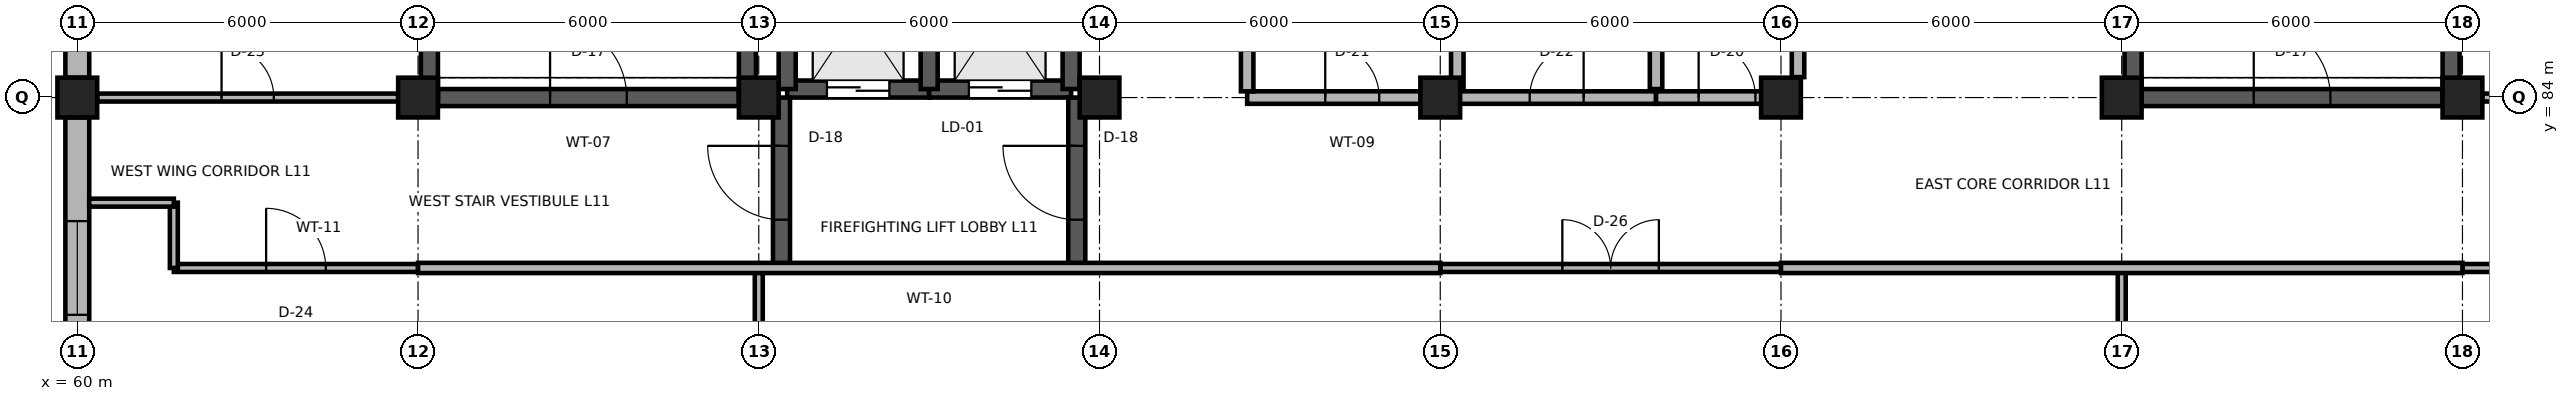
"""IFC4 building model, lengths in metres.
Left out: names, types, materials, properties, quantities, classifications, styles, units other than length and angle.
Written with IfcOpenShell. Run it as: python <this file> out.ifc"""

import sys

from ifc_helpers import new_model, si_unit, direction, frame, frame_2d, origin, origin_2d, place, context, subcontext, project, spatial, rectangle, extrude, element, fill, save


model = new_model("IFC4")
c1 = context("Model", 3, precision=1e-05, world=origin(), true_north=direction((0.0, 1.0)))
c2 = subcontext(c1, "Body", "Model", "MODEL_VIEW")
j1 = project(units=[si_unit("LENGTHUNIT", "METRE"), si_unit("PLANEANGLEUNIT", "RADIAN")], contexts=[c1])
p1 = place(None, origin())
s1 = spatial("IfcSite", under=j1, at=p1, CompositionType="ELEMENT")
p2 = place(p1, origin())
s2 = spatial("IfcBuilding", under=s1, at=p2, CompositionType="ELEMENT")
p3 = place(p2, frame((0.0, 0.0, 44.4)))
s3 = spatial("IfcBuildingStorey", under=s2, at=p3, CompositionType="ELEMENT", Elevation=44.4)
for number, where, z_axis, x_axis in (
    (1, (60.0, 84.0, 0.0), (0.0, 0.0, 1.0), (1.0, 0.0, 0.0)),
    (2, (66.0, 84.0, 0.0), (0.0, 0.0, 1.0), (1.0, 0.0, 0.0)),
    (3, (72.0, 84.0, 0.0), (0.0, 0.0, 1.0), (1.0, 0.0, 0.0)),
    (4, (78.0, 84.0, 0.0), (0.0, 0.0, 1.0), (1.0, 0.0, 0.0)),
    (5, (84.0, 84.0, 0.0), (0.0, 0.0, 1.0), (1.0, 0.0, 0.0)),
    (6, (90.0, 84.0, 0.0), (0.0, 0.0, 1.0), (1.0, 0.0, 0.0)),
    (7, (96.0, 84.0, 0.0), (0.0, 0.0, 1.0), (1.0, 0.0, 0.0)),
    (8, (102.0, 84.0, 0.0), (0.0, 0.0, 1.0), (1.0, 0.0, 0.0)),
):
    element("IfcColumn", number, at=place(p3, frame(where, z_axis=z_axis, x_axis=x_axis)), inside=s3, PredefinedType="COLUMN", context=c2, shape_type="SweptSolid", body=[
        extrude(rectangle(XDim=0.7, YDim=0.7, at=origin_2d()), origin(), (0.0, 0.0, 1.0), 3.9),
    ])
p4 = place(p3, frame((60.0, 78.35, 0.0), z_axis=(0.0, 0.0, 1.0), x_axis=(0.0, 1.0, 0.0)))
e9 = element("IfcWall", 9, at=p4, inside=s3, PredefinedType="SOLIDWALL", context=c2, shape_type="SweptSolid", body=[
    extrude(rectangle(XDim=5.3, YDim=0.42, at=frame_2d((2.65, 0.0))), origin(), (0.0, 0.0, 1.0), 3.32),
])
p5 = place(p4, frame((1.825, 0.0, 0.85)))
e10 = element("IfcOpeningElement", 10, at=p5, cuts=e9, PredefinedType="OPENING", context=c2, shape_type="SweptSolid", body=[
    extrude(rectangle(XDim=1.65, YDim=1.95, at=frame_2d((0.825, 0.975))), frame((0.0, 0.225, 0.0), z_axis=(0.0, -1.0, 0.0), x_axis=(1.0, 0.0, 0.0)), (0.0, 0.0, 1.0), 0.45),
])
p6 = place(p3, frame((60.0, 84.35, 0.0), z_axis=(0.0, 0.0, 1.0), x_axis=(0.0, 1.0, 0.0)))
e11 = element("IfcWall", 11, at=p6, inside=s3, PredefinedType="SOLIDWALL", context=c2, shape_type="SweptSolid", body=[
    extrude(rectangle(XDim=5.3, YDim=0.42, at=frame_2d((2.65, 0.0))), origin(), (0.0, 0.0, 1.0), 3.32),
])
p7 = place(p6, frame((1.825, 0.0, 0.85)))
e12 = element("IfcOpeningElement", 12, at=p7, cuts=e11, PredefinedType="OPENING", context=c2, shape_type="SweptSolid", body=[
    extrude(rectangle(XDim=1.65, YDim=1.95, at=frame_2d((0.825, 0.975))), frame((0.0, 0.225, 0.0), z_axis=(0.0, -1.0, 0.0), x_axis=(1.0, 0.0, 0.0)), (0.0, 0.0, 1.0), 0.45),
])
p8 = place(p3, frame((66.35, 84.0, 0.0), z_axis=(0.0, 0.0, 1.0), x_axis=(1.0, 0.0, 0.0)))
e13 = element("IfcWall", 13, at=p8, inside=s3, PredefinedType="SHEAR", context=c2, shape_type="SweptSolid", body=[
    extrude(rectangle(XDim=5.3, YDim=0.3, at=frame_2d((2.65, 0.0))), origin(), (0.0, 0.0, 1.0), 3.66),
])
p9 = place(p8, frame((1.975, 0.0, 0.0)))
e14 = element("IfcOpeningElement", 14, at=p9, cuts=e13, PredefinedType="OPENING", context=c2, shape_type="SweptSolid", body=[
    extrude(rectangle(XDim=1.35, YDim=2.2, at=frame_2d((0.675, 1.1))), frame((0.0, 0.165, 0.0), z_axis=(0.0, -1.0, 0.0), x_axis=(1.0, 0.0, 0.0)), (0.0, 0.0, 1.0), 0.33),
])
for number, where, z_axis, x_axis in (
    (15, (66.2, 84.0, 0.0), (0.0, 0.0, 1.0), (0.0, 1.0, 0.0)),
    (16, (71.8, 84.0, 0.0), (0.0, 0.0, 1.0), (0.0, 1.0, 0.0)),
):
    element("IfcWall", number, at=place(p3, frame(where, z_axis=z_axis, x_axis=x_axis)), inside=s3, PredefinedType="SHEAR", context=c2, shape_type="SweptSolid", body=[
        extrude(rectangle(XDim=11.8, YDim=0.3, at=frame_2d((5.9, 0.0))), origin(), (0.0, 0.0, 1.0), 3.74),
    ])
p10 = place(p3, frame((96.35, 84.0, 0.0), z_axis=(0.0, 0.0, 1.0), x_axis=(1.0, 0.0, 0.0)))
e17 = element("IfcWall", 17, at=p10, inside=s3, PredefinedType="SHEAR", context=c2, shape_type="SweptSolid", body=[
    extrude(rectangle(XDim=5.3, YDim=0.3, at=frame_2d((2.65, 0.0))), origin(), (0.0, 0.0, 1.0), 3.66),
])
p11 = place(p10, frame((1.975, 0.0, 0.0)))
e18 = element("IfcOpeningElement", 18, at=p11, cuts=e17, PredefinedType="OPENING", context=c2, shape_type="SweptSolid", body=[
    extrude(rectangle(XDim=1.35, YDim=2.2, at=frame_2d((0.675, 1.1))), frame((0.0, 0.165, 0.0), z_axis=(0.0, -1.0, 0.0), x_axis=(1.0, 0.0, 0.0)), (0.0, 0.0, 1.0), 0.33),
])
for number, where, z_axis, x_axis in (
    (19, (96.2, 84.0, 0.0), (0.0, 0.0, 1.0), (0.0, 1.0, 0.0)),
    (20, (101.8, 84.0, 0.0), (0.0, 0.0, 1.0), (0.0, 1.0, 0.0)),
):
    element("IfcWall", number, at=place(p3, frame(where, z_axis=z_axis, x_axis=x_axis)), inside=s3, PredefinedType="SHEAR", context=c2, shape_type="SweptSolid", body=[
        extrude(rectangle(XDim=11.8, YDim=0.3, at=frame_2d((5.9, 0.0))), origin(), (0.0, 0.0, 1.0), 3.74),
    ])
p12 = place(p3, frame((72.5, 84.15, 0.0), z_axis=(0.0, 0.0, 1.0), x_axis=(1.0, 0.0, 0.0)))
e21 = element("IfcWall", 21, at=p12, inside=s3, PredefinedType="SHEAR", context=c2, shape_type="SweptSolid", body=[
    extrude(rectangle(XDim=2.5, YDim=0.3, at=frame_2d((1.25, 0.0))), origin(), (0.0, 0.0, 1.0), 3.74),
])
p13 = place(p12, frame((0.7, 0.0, 0.0)))
e22 = element("IfcOpeningElement", 22, at=p13, cuts=e21, PredefinedType="OPENING", context=c2, shape_type="SweptSolid", body=[
    extrude(rectangle(XDim=1.1, YDim=2.1, at=frame_2d((0.55, 1.05))), frame((0.0, 0.165, 0.0), z_axis=(0.0, -1.0, 0.0), x_axis=(1.0, 0.0, 0.0)), (0.0, 0.0, 1.0), 0.33),
])
p14 = place(p3, frame((72.5, 84.15, 0.0), z_axis=(0.0, 0.0, 1.0), x_axis=(0.0, 1.0, 0.0)))
e23 = element("IfcWall", 23, at=p14, inside=s3, PredefinedType="SHEAR", context=c2, shape_type="SweptSolid", body=[
    extrude(rectangle(XDim=3.4, YDim=0.3, at=frame_2d((1.7, 0.0))), origin(), (0.0, 0.0, 1.0), 3.74),
])
p15 = place(p3, frame((75.0, 84.15, 0.0), z_axis=(0.0, 0.0, 1.0), x_axis=(1.0, 0.0, 0.0)))
e24 = element("IfcWall", 24, at=p15, inside=s3, PredefinedType="SHEAR", context=c2, shape_type="SweptSolid", body=[
    extrude(rectangle(XDim=2.5, YDim=0.3, at=frame_2d((1.25, 0.0))), origin(), (0.0, 0.0, 1.0), 3.74),
])
p16 = place(p15, frame((0.7, 0.0, 0.0)))
e25 = element("IfcOpeningElement", 25, at=p16, cuts=e24, PredefinedType="OPENING", context=c2, shape_type="SweptSolid", body=[
    extrude(rectangle(XDim=1.1, YDim=2.1, at=frame_2d((0.55, 1.05))), frame((0.0, 0.165, 0.0), z_axis=(0.0, -1.0, 0.0), x_axis=(1.0, 0.0, 0.0)), (0.0, 0.0, 1.0), 0.33),
])
for number, where, z_axis, x_axis in (
    (26, (75.0, 84.15, 0.0), (0.0, 0.0, 1.0), (0.0, 1.0, 0.0)),
    (27, (77.5, 84.15, 0.0), (0.0, 0.0, 1.0), (0.0, 1.0, 0.0)),
):
    element("IfcWall", number, at=place(p3, frame(where, z_axis=z_axis, x_axis=x_axis)), inside=s3, PredefinedType="SHEAR", context=c2, shape_type="SweptSolid", body=[
        extrude(rectangle(XDim=3.4, YDim=0.3, at=frame_2d((1.7, 0.0))), origin(), (0.0, 0.0, 1.0), 3.74),
    ])
p17 = place(p3, frame((72.4, 81.0, 0.0), z_axis=(0.0, 0.0, 1.0), x_axis=(0.0, 1.0, 0.0)))
e28 = element("IfcWall", 28, at=p17, inside=s3, PredefinedType="SHEAR", context=c2, shape_type="SweptSolid", body=[
    extrude(rectangle(XDim=3.0, YDim=0.3, at=frame_2d((1.5, 0.0))), origin(), (0.0, 0.0, 1.0), 3.74),
])
p18 = place(p17, frame((0.85, 0.0, 0.0)))
e29 = element("IfcOpeningElement", 29, at=p18, cuts=e28, PredefinedType="OPENING", context=c2, shape_type="SweptSolid", body=[
    extrude(rectangle(XDim=1.3, YDim=2.2, at=frame_2d((0.65, 1.1))), frame((0.0, 0.165, 0.0), z_axis=(0.0, -1.0, 0.0), x_axis=(1.0, 0.0, 0.0)), (0.0, 0.0, 1.0), 0.33),
])
p19 = place(p3, frame((77.6, 81.0, 0.0), z_axis=(0.0, 0.0, 1.0), x_axis=(0.0, 1.0, 0.0)))
e30 = element("IfcWall", 30, at=p19, inside=s3, PredefinedType="SHEAR", context=c2, shape_type="SweptSolid", body=[
    extrude(rectangle(XDim=3.0, YDim=0.3, at=frame_2d((1.5, 0.0))), origin(), (0.0, 0.0, 1.0), 3.74),
])
p20 = place(p19, frame((0.85, 0.0, 0.0)))
e31 = element("IfcOpeningElement", 31, at=p20, cuts=e30, PredefinedType="OPENING", context=c2, shape_type="SweptSolid", body=[
    extrude(rectangle(XDim=1.3, YDim=2.2, at=frame_2d((0.65, 1.1))), frame((0.0, 0.165, 0.0), z_axis=(0.0, -1.0, 0.0), x_axis=(1.0, 0.0, 0.0)), (0.0, 0.0, 1.0), 0.33),
])
p21 = place(p3, frame((80.6, 84.0, 0.0), z_axis=(0.0, 0.0, 1.0), x_axis=(1.0, 0.0, 0.0)))
e32 = element("IfcWall", 32, at=p21, inside=s3, PredefinedType="PARTITIONING", context=c2, shape_type="SweptSolid", body=[
    extrude(rectangle(XDim=3.7, YDim=0.22, at=frame_2d((1.85, 0.0))), origin(), (0.0, 0.0, 1.0), 3.348),
])
p22 = place(p21, frame((1.375, 0.0, 0.0)))
e33 = element("IfcOpeningElement", 33, at=p22, cuts=e32, PredefinedType="OPENING", context=c2, shape_type="SweptSolid", body=[
    extrude(rectangle(XDim=0.95, YDim=2.15, at=frame_2d((0.475, 1.075))), frame((0.0, 0.125, 0.0), z_axis=(0.0, -1.0, 0.0), x_axis=(1.0, 0.0, 0.0)), (0.0, 0.0, 1.0), 0.25),
])
p23 = place(p3, frame((84.3, 84.0, 0.0), z_axis=(0.0, 0.0, 1.0), x_axis=(1.0, 0.0, 0.0)))
e34 = element("IfcWall", 34, at=p23, inside=s3, PredefinedType="PARTITIONING", context=c2, shape_type="SweptSolid", body=[
    extrude(rectangle(XDim=3.5, YDim=0.22, at=frame_2d((1.75, 0.0))), origin(), (0.0, 0.0, 1.0), 3.348),
])
p24 = place(p23, frame((1.275, 0.0, 0.0)))
e35 = element("IfcOpeningElement", 35, at=p24, cuts=e34, PredefinedType="OPENING", context=c2, shape_type="SweptSolid", body=[
    extrude(rectangle(XDim=0.95, YDim=2.1, at=frame_2d((0.475, 1.05))), frame((0.0, 0.125, 0.0), z_axis=(0.0, -1.0, 0.0), x_axis=(1.0, 0.0, 0.0)), (0.0, 0.0, 1.0), 0.25),
])
p25 = place(p3, frame((87.8, 84.0, 0.0), z_axis=(0.0, 0.0, 1.0), x_axis=(1.0, 0.0, 0.0)))
e36 = element("IfcWall", 36, at=p25, inside=s3, PredefinedType="PARTITIONING", context=c2, shape_type="SweptSolid", body=[
    extrude(rectangle(XDim=2.5, YDim=0.22, at=frame_2d((1.25, 0.0))), origin(), (0.0, 0.0, 1.0), 3.348),
])
p26 = place(p25, frame((0.75, 0.0, 0.0)))
e37 = element("IfcOpeningElement", 37, at=p26, cuts=e36, PredefinedType="OPENING", context=c2, shape_type="SweptSolid", body=[
    extrude(rectangle(XDim=1.0, YDim=2.15, at=frame_2d((0.5, 1.075))), frame((0.0, 0.125, 0.0), z_axis=(0.0, -1.0, 0.0), x_axis=(1.0, 0.0, 0.0)), (0.0, 0.0, 1.0), 0.25),
])
for number, where, z_axis, x_axis in (
    (38, (84.3, 84.15, 0.0), (0.0, 0.0, 1.0), (0.0, 1.0, 0.0)),
    (39, (87.8, 84.15, 0.0), (0.0, 0.0, 1.0), (0.0, 1.0, 0.0)),
):
    element("IfcWall", number, at=place(p3, frame(where, z_axis=z_axis, x_axis=x_axis)), inside=s3, PredefinedType="PARTITIONING", context=c2, shape_type="SweptSolid", body=[
        extrude(rectangle(XDim=5.0, YDim=0.22, at=frame_2d((2.5, 0.0))), origin(), (0.0, 0.0, 1.0), 3.74),
    ])
p27 = place(p3, frame((61.7, 81.0, 0.0), z_axis=(0.0, 0.0, 1.0), x_axis=(1.0, 0.0, 0.0)))
e40 = element("IfcWall", 40, at=p27, inside=s3, PredefinedType="PARTITIONING", context=c2, shape_type="SweptSolid", body=[
    extrude(rectangle(XDim=4.3, YDim=0.14, at=frame_2d((2.15, 0.0))), origin(), (0.0, 0.0, 1.0), 3.74),
])
p28 = place(p27, frame((1.625, 0.0, 0.0)))
e41 = element("IfcOpeningElement", 41, at=p28, cuts=e40, PredefinedType="OPENING", context=c2, shape_type="SweptSolid", body=[
    extrude(rectangle(XDim=1.05, YDim=2.25, at=frame_2d((0.525, 1.125))), frame((0.0, 0.085, 0.0), z_axis=(0.0, -1.0, 0.0), x_axis=(1.0, 0.0, 0.0)), (0.0, 0.0, 1.0), 0.17),
])
p29 = place(p3, frame((84.0, 81.0, 0.0), z_axis=(0.0, 0.0, 1.0), x_axis=(1.0, 0.0, 0.0)))
e42 = element("IfcWall", 42, at=p29, inside=s3, PredefinedType="PARTITIONING", context=c2, shape_type="SweptSolid", body=[
    extrude(rectangle(XDim=6.0, YDim=0.14, at=frame_2d((3.0, 0.0))), origin(), (0.0, 0.0, 1.0), 3.74),
])
p30 = place(p29, frame((2.15, 0.0, 0.0)))
e43 = element("IfcOpeningElement", 43, at=p30, cuts=e42, PredefinedType="OPENING", context=c2, shape_type="SweptSolid", body=[
    extrude(rectangle(XDim=1.7, YDim=2.45, at=frame_2d((0.85, 1.225))), frame((0.0, 0.085, 0.0), z_axis=(0.0, -1.0, 0.0), x_axis=(1.0, 0.0, 0.0)), (0.0, 0.0, 1.0), 0.17),
])
p31 = place(p3, frame((102.0, 81.0, 0.0), z_axis=(0.0, 0.0, 1.0), x_axis=(1.0, 0.0, 0.0)))
e44 = element("IfcWall", 44, at=p31, inside=s3, PredefinedType="PARTITIONING", context=c2, shape_type="SweptSolid", body=[
    extrude(rectangle(XDim=4.3, YDim=0.14, at=frame_2d((2.15, 0.0))), origin(), (0.0, 0.0, 1.0), 3.74),
])
p32 = place(p31, frame((1.625, 0.0, 0.0)))
e45 = element("IfcOpeningElement", 45, at=p32, cuts=e44, PredefinedType="OPENING", context=c2, shape_type="SweptSolid", body=[
    extrude(rectangle(XDim=1.05, YDim=2.25, at=frame_2d((0.525, 1.125))), frame((0.0, 0.085, 0.0), z_axis=(0.0, -1.0, 0.0), x_axis=(1.0, 0.0, 0.0)), (0.0, 0.0, 1.0), 0.17),
])
p33 = place(p3, frame((60.35, 84.0, 0.0), z_axis=(0.0, 0.0, 1.0), x_axis=(1.0, 0.0, 0.0)))
e46 = element("IfcWall", 46, at=p33, inside=s3, PredefinedType="PARTITIONING", context=c2, shape_type="SweptSolid", body=[
    extrude(rectangle(XDim=5.3, YDim=0.14, at=frame_2d((2.65, 0.0))), origin(), (0.0, 0.0, 1.0), 3.348),
])
p34 = place(p33, frame((2.19, 0.0, 0.0)))
e47 = element("IfcOpeningElement", 47, at=p34, cuts=e46, PredefinedType="OPENING", context=c2, shape_type="SweptSolid", body=[
    extrude(rectangle(XDim=0.92, YDim=2.15, at=frame_2d((0.46, 1.075))), frame((0.0, 0.085, 0.0), z_axis=(0.0, -1.0, 0.0), x_axis=(1.0, 0.0, 0.0)), (0.0, 0.0, 1.0), 0.17),
])
p35 = place(p3, frame((102.35, 84.0, 0.0), z_axis=(0.0, 0.0, 1.0), x_axis=(1.0, 0.0, 0.0)))
e48 = element("IfcWall", 48, at=p35, inside=s3, PredefinedType="PARTITIONING", context=c2, shape_type="SweptSolid", body=[
    extrude(rectangle(XDim=5.3, YDim=0.14, at=frame_2d((2.65, 0.0))), origin(), (0.0, 0.0, 1.0), 3.348),
])
p36 = place(p35, frame((2.19, 0.0, 0.0)))
e49 = element("IfcOpeningElement", 49, at=p36, cuts=e48, PredefinedType="OPENING", context=c2, shape_type="SweptSolid", body=[
    extrude(rectangle(XDim=0.92, YDim=2.15, at=frame_2d((0.46, 1.075))), frame((0.0, 0.085, 0.0), z_axis=(0.0, -1.0, 0.0), x_axis=(1.0, 0.0, 0.0)), (0.0, 0.0, 1.0), 0.17),
])
for number, where, z_axis, x_axis in (
    (50, (72.0, 72.65, 0.0), (0.0, 0.0, 1.0), (0.0, 1.0, 0.0)),
    (51, (96.0, 72.65, 0.0), (0.0, 0.0, 1.0), (0.0, 1.0, 0.0)),
):
    element("IfcWall", number, at=place(p3, frame(where, z_axis=z_axis, x_axis=x_axis)), inside=s3, PredefinedType="PARTITIONING", context=c2, shape_type="SweptSolid", body=[
        extrude(rectangle(XDim=8.35, YDim=0.14, at=frame_2d((4.175, 0.0))), origin(), (0.0, 0.0, 1.0), 3.348),
    ])
p37 = place(p3, frame((80.6, 84.11, 0.0), z_axis=(0.0, 0.0, 1.0), x_axis=(0.0, 1.0, 0.0)))
e52 = element("IfcWall", 52, at=p37, inside=s3, PredefinedType="PARTITIONING", context=c2, shape_type="SweptSolid", body=[
    extrude(rectangle(XDim=4.98, YDim=0.22, at=frame_2d((2.49, 0.0))), origin(), (0.0, 0.0, 1.0), 3.74),
])
p38 = place(p3, frame((90.3, 84.36, 0.0), z_axis=(0.0, 0.0, 1.0), x_axis=(0.0, 1.0, 0.0)))
e53 = element("IfcWall", 53, at=p38, inside=s3, PredefinedType="PARTITIONING", context=c2, shape_type="SweptSolid", body=[
    extrude(rectangle(XDim=4.73, YDim=0.22, at=frame_2d((2.365, 0.0))), origin(), (0.0, 0.0, 1.0), 3.74),
])
p39 = place(p3, frame((66.0, 81.0, 0.0), z_axis=(0.0, 0.0, 1.0), x_axis=(1.0, 0.0, 0.0)))
e54 = element("IfcWall", 54, at=p39, inside=s3, PredefinedType="PARTITIONING", context=c2, shape_type="SweptSolid", body=[
    extrude(rectangle(XDim=18.0, YDim=0.18, at=frame_2d((9.0, 0.0))), origin(), (0.0, 0.0, 1.0), 3.74),
])
p40 = place(p3, frame((90.0, 81.0, 0.0), z_axis=(0.0, 0.0, 1.0), x_axis=(1.0, 0.0, 0.0)))
e55 = element("IfcWall", 55, at=p40, inside=s3, PredefinedType="PARTITIONING", context=c2, shape_type="SweptSolid", body=[
    extrude(rectangle(XDim=12.0, YDim=0.18, at=frame_2d((6.0, 0.0))), origin(), (0.0, 0.0, 1.0), 3.74),
])
p41 = place(p3, frame((61.7, 81.0, 0.0), z_axis=(0.0, 0.0, 1.0), x_axis=(0.0, 1.0, 0.0)))
e56 = element("IfcWall", 56, at=p41, inside=s3, PredefinedType="PARTITIONING", context=c2, shape_type="SweptSolid", body=[
    extrude(rectangle(XDim=1.15, YDim=0.14, at=frame_2d((0.575, 0.0))), origin(), (0.0, 0.0, 1.0), 3.74),
])
p42 = place(p3, frame((61.7, 82.15, 0.0), z_axis=(0.0, 0.0, 1.0), x_axis=(-1.0, 0.0, 0.0)))
e57 = element("IfcWall", 57, at=p42, inside=s3, PredefinedType="PARTITIONING", context=c2, shape_type="SweptSolid", body=[
    extrude(rectangle(XDim=1.49, YDim=0.14, at=frame_2d((0.745, 0.0))), origin(), (0.0, 0.0, 1.0), 3.74),
])
p43 = place(p5, origin())
e58 = element("IfcWindow", 58, at=p43, inside=s3, PartitioningType="SINGLE_PANEL", PredefinedType="WINDOW", context=c2, shape_type="SweptSolid", body=[
    extrude(rectangle(XDim=1.65, YDim=1.95, at=frame_2d((0.825, 0.975))), frame((0.0, 0.03, 0.0), z_axis=(0.0, -1.0, 0.0), x_axis=(1.0, 0.0, 0.0)), (0.0, 0.0, 1.0), 0.06),
])
fill(e10, e58)
p44 = place(p9, origin())
e59 = element("IfcDoor", 59, at=p44, inside=s3, OperationType="SINGLE_SWING_LEFT", PredefinedType="DOOR", context=c2, shape_type="SweptSolid", body=[
    extrude(rectangle(XDim=1.35, YDim=2.2, at=frame_2d((0.675, 1.1))), frame((0.0, 0.025, 0.0), z_axis=(0.0, -1.0, 0.0), x_axis=(1.0, 0.0, 0.0)), (0.0, 0.0, 1.0), 0.05),
])
fill(e14, e59)
p45 = place(p11, origin())
e60 = element("IfcDoor", 60, at=p45, inside=s3, OperationType="SINGLE_SWING_LEFT", PredefinedType="DOOR", context=c2, shape_type="SweptSolid", body=[
    extrude(rectangle(XDim=1.35, YDim=2.2, at=frame_2d((0.675, 1.1))), frame((0.0, 0.025, 0.0), z_axis=(0.0, -1.0, 0.0), x_axis=(1.0, 0.0, 0.0)), (0.0, 0.0, 1.0), 0.05),
])
fill(e18, e60)
p46 = place(p13, origin())
e61 = element("IfcDoor", 61, at=p46, inside=s3, OperationType="DOUBLE_DOOR_SLIDING", PredefinedType="DOOR", context=c2, shape_type="SweptSolid", body=[
    extrude(rectangle(XDim=1.1, YDim=2.1, at=frame_2d((0.55, 1.05))), frame((0.0, 0.025, 0.0), z_axis=(0.0, -1.0, 0.0), x_axis=(1.0, 0.0, 0.0)), (0.0, 0.0, 1.0), 0.05),
])
fill(e22, e61)
p47 = place(p16, origin())
e62 = element("IfcDoor", 62, at=p47, inside=s3, OperationType="DOUBLE_DOOR_SLIDING", PredefinedType="DOOR", context=c2, shape_type="SweptSolid", body=[
    extrude(rectangle(XDim=1.1, YDim=2.1, at=frame_2d((0.55, 1.05))), frame((0.0, 0.025, 0.0), z_axis=(0.0, -1.0, 0.0), x_axis=(1.0, 0.0, 0.0)), (0.0, 0.0, 1.0), 0.05),
])
fill(e25, e62)
p48 = place(p18, origin())
e63 = element("IfcDoor", 63, at=p48, inside=s3, OperationType="SINGLE_SWING_RIGHT", PredefinedType="DOOR", context=c2, shape_type="SweptSolid", body=[
    extrude(rectangle(XDim=1.3, YDim=2.2, at=frame_2d((0.65, 1.1))), frame((0.0, 0.025, 0.0), z_axis=(0.0, -1.0, 0.0), x_axis=(1.0, 0.0, 0.0)), (0.0, 0.0, 1.0), 0.05),
])
fill(e29, e63)
p49 = place(p20, origin())
e64 = element("IfcDoor", 64, at=p49, inside=s3, OperationType="SINGLE_SWING_RIGHT", PredefinedType="DOOR", context=c2, shape_type="SweptSolid", body=[
    extrude(rectangle(XDim=1.3, YDim=2.2, at=frame_2d((0.65, 1.1))), frame((0.0, 0.025, 0.0), z_axis=(0.0, -1.0, 0.0), x_axis=(1.0, 0.0, 0.0)), (0.0, 0.0, 1.0), 0.05),
])
fill(e31, e64)
p50 = place(p22, origin())
e65 = element("IfcDoor", 65, at=p50, inside=s3, OperationType="SINGLE_SWING_LEFT", PredefinedType="DOOR", context=c2, shape_type="SweptSolid", body=[
    extrude(rectangle(XDim=0.95, YDim=2.15, at=frame_2d((0.475, 1.075))), frame((0.0, 0.025, 0.0), z_axis=(0.0, -1.0, 0.0), x_axis=(1.0, 0.0, 0.0)), (0.0, 0.0, 1.0), 0.05),
])
fill(e33, e65)
p51 = place(p24, origin())
e66 = element("IfcDoor", 66, at=p51, inside=s3, OperationType="SINGLE_SWING_RIGHT", PredefinedType="DOOR", context=c2, shape_type="SweptSolid", body=[
    extrude(rectangle(XDim=0.95, YDim=2.1, at=frame_2d((0.475, 1.05))), frame((0.0, 0.025, 0.0), z_axis=(0.0, -1.0, 0.0), x_axis=(1.0, 0.0, 0.0)), (0.0, 0.0, 1.0), 0.05),
])
fill(e35, e66)
p52 = place(p26, origin())
e67 = element("IfcDoor", 67, at=p52, inside=s3, OperationType="SINGLE_SWING_LEFT", PredefinedType="DOOR", context=c2, shape_type="SweptSolid", body=[
    extrude(rectangle(XDim=1.0, YDim=2.15, at=frame_2d((0.5, 1.075))), frame((0.0, 0.025, 0.0), z_axis=(0.0, -1.0, 0.0), x_axis=(1.0, 0.0, 0.0)), (0.0, 0.0, 1.0), 0.05),
])
fill(e37, e67)
p53 = place(p28, origin())
e68 = element("IfcDoor", 68, at=p53, inside=s3, OperationType="SINGLE_SWING_LEFT", PredefinedType="DOOR", context=c2, shape_type="SweptSolid", body=[
    extrude(rectangle(XDim=1.05, YDim=2.25, at=frame_2d((0.525, 1.125))), frame((0.0, 0.025, 0.0), z_axis=(0.0, -1.0, 0.0), x_axis=(1.0, 0.0, 0.0)), (0.0, 0.0, 1.0), 0.05),
])
fill(e41, e68)
p54 = place(p30, origin())
e69 = element("IfcDoor", 69, at=p54, inside=s3, OperationType="DOUBLE_DOOR_SINGLE_SWING", PredefinedType="DOOR", context=c2, shape_type="SweptSolid", body=[
    extrude(rectangle(XDim=1.7, YDim=2.45, at=frame_2d((0.85, 1.225))), frame((0.0, 0.025, 0.0), z_axis=(0.0, -1.0, 0.0), x_axis=(1.0, 0.0, 0.0)), (0.0, 0.0, 1.0), 0.05),
])
fill(e43, e69)
p55 = place(p34, origin())
e70 = element("IfcDoor", 70, at=p55, inside=s3, OperationType="SINGLE_SWING_LEFT", PredefinedType="DOOR", context=c2, shape_type="SweptSolid", body=[
    extrude(rectangle(XDim=0.92, YDim=2.15, at=frame_2d((0.46, 1.075))), frame((0.0, 0.025, 0.0), z_axis=(0.0, -1.0, 0.0), x_axis=(1.0, 0.0, 0.0)), (0.0, 0.0, 1.0), 0.05),
])
fill(e47, e70)
save(model, sys.argv[1])
